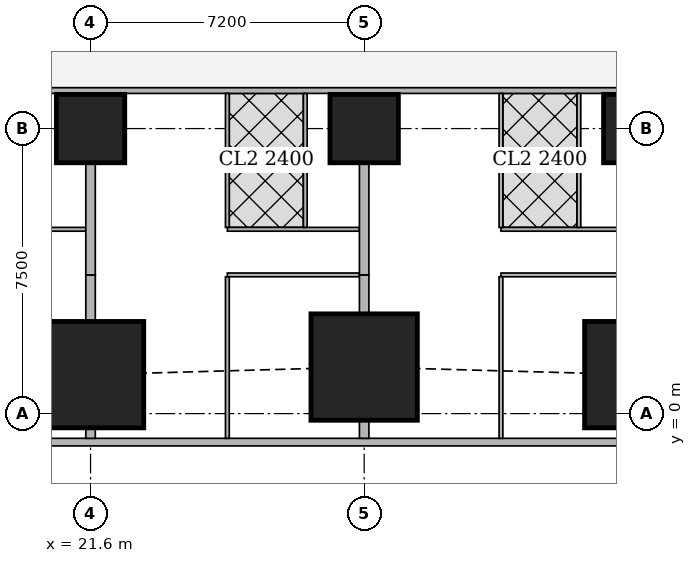
"""IFC4 building model, lengths in metres.
Left out: names, types, materials, properties, quantities, classifications, styles, units other than length and angle.
Written with IfcOpenShell. Run it as: python <this file> out.ifc"""

import sys

from ifc_helpers import new_model, si_unit, direction, frame, frame_2d, origin, origin_2d, place, context, subcontext, project, spatial, rectangle, extrude, element, fill, save


model = new_model("IFC4")
c1 = context("Model", 3, precision=1e-05, world=origin(), true_north=direction((0.0, 1.0)))
c2 = subcontext(c1, "Body", "Model", "MODEL_VIEW")
j1 = project(units=[si_unit("LENGTHUNIT", "METRE"), si_unit("PLANEANGLEUNIT", "RADIAN")], contexts=[c1])
p1 = place(None, origin())
s1 = spatial("IfcSite", under=j1, at=p1, CompositionType="ELEMENT")
p2 = place(p1, origin())
s2 = spatial("IfcBuilding", under=s1, at=p2, CompositionType="ELEMENT")
p3 = place(p2, frame((0.0, 0.0, 42.5)))
s3 = spatial("IfcBuildingStorey", under=s2, at=p3, CompositionType="ELEMENT", Elevation=42.5)
for number, where, z_axis, x_axis in (
    (1, (21.6, 1.025, 0.0), (0.0, 0.0, 1.0), (1.0, 0.0, 0.0)),
    (2, (28.8, 1.225, 0.0), (0.0, 0.0, 1.0), (1.0, 0.0, 0.0)),
    (3, (36.0, 1.025, 0.0), (0.0, 0.0, 1.0), (1.0, 0.0, 0.0)),
):
    element("IfcColumn", number, at=place(p3, frame(where, z_axis=z_axis, x_axis=x_axis)), inside=s3, PredefinedType="COLUMN", context=c2, shape_type="SweptSolid", body=[
        extrude(rectangle(XDim=2.8, YDim=2.8, at=origin_2d()), origin(), (0.0, 0.0, 1.0), 3.75),
    ])
for number, where, z_axis, x_axis in (
    (4, (21.6, 7.5, 0.0), (0.0, 0.0, 1.0), (1.0, 0.0, 0.0)),
    (5, (28.8, 7.5, 0.0), (0.0, 0.0, 1.0), (1.0, 0.0, 0.0)),
    (6, (36.0, 7.5, 0.0), (0.0, 0.0, 1.0), (1.0, 0.0, 0.0)),
):
    element("IfcColumn", number, at=place(p3, frame(where, z_axis=z_axis, x_axis=x_axis)), inside=s3, PredefinedType="COLUMN", context=c2, shape_type="SweptSolid", body=[
        extrude(rectangle(XDim=1.8, YDim=1.8, at=origin_2d()), origin(), (0.0, 0.0, 1.0), 3.75),
    ])
p4 = place(p3, frame((2.163, -0.75, 0.0), z_axis=(0.0, 0.0, 1.0), x_axis=(1.0, 0.0, 0.0)))
e7 = element("IfcWall", 7, at=p4, inside=s3, PredefinedType="SOLIDWALL", context=c2, shape_type="SweptSolid", body=[
    extrude(rectangle(XDim=45.628, YDim=0.2, at=frame_2d((22.814, 0.0))), origin(), (0.0, 0.0, 1.0), 3.5),
])
p5 = place(p4, frame((9.537, 0.0, 0.9)))
e8 = element("IfcOpeningElement", 8, at=p5, cuts=e7, PredefinedType="OPENING", context=c2, shape_type="SweptSolid", body=[
    extrude(rectangle(XDim=1.8, YDim=1.5, at=frame_2d((0.9, 0.75))), frame((0.0, 0.11, 0.0), z_axis=(0.0, -1.0, 0.0), x_axis=(1.0, 0.0, 0.0)), (0.0, 0.0, 1.0), 0.22),
])
p6 = place(p4, frame((13.137, 0.0, 0.9)))
e9 = element("IfcOpeningElement", 9, at=p6, cuts=e7, PredefinedType="OPENING", context=c2, shape_type="SweptSolid", body=[
    extrude(rectangle(XDim=1.8, YDim=1.5, at=frame_2d((0.9, 0.75))), frame((0.0, 0.11, 0.0), z_axis=(0.0, -1.0, 0.0), x_axis=(1.0, 0.0, 0.0)), (0.0, 0.0, 1.0), 0.22),
])
p7 = place(p4, frame((16.737, 0.0, 0.9)))
e10 = element("IfcOpeningElement", 10, at=p7, cuts=e7, PredefinedType="OPENING", context=c2, shape_type="SweptSolid", body=[
    extrude(rectangle(XDim=1.8, YDim=1.5, at=frame_2d((0.9, 0.75))), frame((0.0, 0.11, 0.0), z_axis=(0.0, -1.0, 0.0), x_axis=(1.0, 0.0, 0.0)), (0.0, 0.0, 1.0), 0.22),
])
p8 = place(p4, frame((20.337, 0.0, 0.9)))
e11 = element("IfcOpeningElement", 11, at=p8, cuts=e7, PredefinedType="OPENING", context=c2, shape_type="SweptSolid", body=[
    extrude(rectangle(XDim=1.8, YDim=1.5, at=frame_2d((0.9, 0.75))), frame((0.0, 0.11, 0.0), z_axis=(0.0, -1.0, 0.0), x_axis=(1.0, 0.0, 0.0)), (0.0, 0.0, 1.0), 0.22),
])
p9 = place(p4, frame((23.937, 0.0, 0.9)))
e12 = element("IfcOpeningElement", 12, at=p9, cuts=e7, PredefinedType="OPENING", context=c2, shape_type="SweptSolid", body=[
    extrude(rectangle(XDim=1.8, YDim=1.5, at=frame_2d((0.9, 0.75))), frame((0.0, 0.11, 0.0), z_axis=(0.0, -1.0, 0.0), x_axis=(1.0, 0.0, 0.0)), (0.0, 0.0, 1.0), 0.22),
])
p10 = place(p4, frame((27.537, 0.0, 0.9)))
e13 = element("IfcOpeningElement", 13, at=p10, cuts=e7, PredefinedType="OPENING", context=c2, shape_type="SweptSolid", body=[
    extrude(rectangle(XDim=1.8, YDim=1.5, at=frame_2d((0.9, 0.75))), frame((0.0, 0.11, 0.0), z_axis=(0.0, -1.0, 0.0), x_axis=(1.0, 0.0, 0.0)), (0.0, 0.0, 1.0), 0.22),
])
p11 = place(p4, frame((31.137, 0.0, 0.9)))
e14 = element("IfcOpeningElement", 14, at=p11, cuts=e7, PredefinedType="OPENING", context=c2, shape_type="SweptSolid", body=[
    extrude(rectangle(XDim=1.8, YDim=1.5, at=frame_2d((0.9, 0.75))), frame((0.0, 0.11, 0.0), z_axis=(0.0, -1.0, 0.0), x_axis=(1.0, 0.0, 0.0)), (0.0, 0.0, 1.0), 0.22),
])
p12 = place(p4, frame((34.737, 0.0, 0.9)))
e15 = element("IfcOpeningElement", 15, at=p12, cuts=e7, PredefinedType="OPENING", context=c2, shape_type="SweptSolid", body=[
    extrude(rectangle(XDim=1.8, YDim=1.5, at=frame_2d((0.9, 0.75))), frame((0.0, 0.11, 0.0), z_axis=(0.0, -1.0, 0.0), x_axis=(1.0, 0.0, 0.0)), (0.0, 0.0, 1.0), 0.22),
])
p13 = place(p3, frame((40.054, 8.5, 0.0), z_axis=(0.0, 0.0, 1.0), x_axis=(-1.0, 0.0, 0.0)))
e16 = element("IfcWall", 16, at=p13, inside=s3, PredefinedType="SOLIDWALL", context=c2, shape_type="SweptSolid", body=[
    extrude(rectangle(XDim=31.704, YDim=0.15, at=frame_2d((15.852, 0.0))), origin(), (0.0, 0.0, 1.0), 3.5),
])
p14 = place(p13, frame((27.321, 0.0, 0.0)))
e17 = element("IfcOpeningElement", 17, at=p14, cuts=e16, PredefinedType="OPENING", context=c2, shape_type="SweptSolid", body=[
    extrude(rectangle(XDim=1.0, YDim=2.1, at=frame_2d((0.5, 1.05))), frame((0.0, 0.085, 0.0), z_axis=(0.0, -1.0, 0.0), x_axis=(1.0, 0.0, 0.0)), (0.0, 0.0, 1.0), 0.17),
])
p15 = place(p13, frame((23.054, 0.0, 0.0)))
e18 = element("IfcOpeningElement", 18, at=p15, cuts=e16, PredefinedType="OPENING", context=c2, shape_type="SweptSolid", body=[
    extrude(rectangle(XDim=1.0, YDim=2.1, at=frame_2d((0.5, 1.05))), frame((0.0, 0.085, 0.0), z_axis=(0.0, -1.0, 0.0), x_axis=(1.0, 0.0, 0.0)), (0.0, 0.0, 1.0), 0.17),
])
p16 = place(p13, frame((15.854, 0.0, 0.0)))
e19 = element("IfcOpeningElement", 19, at=p16, cuts=e16, PredefinedType="OPENING", context=c2, shape_type="SweptSolid", body=[
    extrude(rectangle(XDim=1.0, YDim=2.1, at=frame_2d((0.5, 1.05))), frame((0.0, 0.085, 0.0), z_axis=(0.0, -1.0, 0.0), x_axis=(1.0, 0.0, 0.0)), (0.0, 0.0, 1.0), 0.17),
])
p17 = place(p13, frame((8.654, 0.0, 0.0)))
e20 = element("IfcOpeningElement", 20, at=p17, cuts=e16, PredefinedType="OPENING", context=c2, shape_type="SweptSolid", body=[
    extrude(rectangle(XDim=1.0, YDim=2.1, at=frame_2d((0.5, 1.05))), frame((0.0, 0.085, 0.0), z_axis=(0.0, -1.0, 0.0), x_axis=(1.0, 0.0, 0.0)), (0.0, 0.0, 1.0), 0.17),
])
p18 = place(p13, frame((0.15, 0.0, 0.0)))
e21 = element("IfcOpeningElement", 21, at=p18, cuts=e16, PredefinedType="OPENING", context=c2, shape_type="SweptSolid", body=[
    extrude(rectangle(XDim=1.0, YDim=2.1, at=frame_2d((0.5, 1.05))), frame((0.0, 0.085, 0.0), z_axis=(0.0, -1.0, 0.0), x_axis=(1.0, 0.0, 0.0)), (0.0, 0.0, 1.0), 0.17),
])
p19 = place(p3, frame((33.68, 42.723, 0.0), z_axis=(0.0, 0.0, 1.0), x_axis=(0.185624129307, -0.98262082342, 0.0)))
e22 = element("IfcWall", 22, at=p19, inside=s3, PredefinedType="SOLIDWALL", context=c2, shape_type="SweptSolid", body=[
    extrude(rectangle(XDim=41.051, YDim=0.15, at=frame_2d((20.526, 0.0))), origin(), (0.0, 0.0, 1.0), 2.5),
])
p20 = place(p19, frame((7.73, 0.0, 0.0)))
e23 = element("IfcOpeningElement", 23, at=p20, cuts=e22, PredefinedType="OPENING", context=c2, shape_type="SweptSolid", body=[
    extrude(rectangle(XDim=1.0, YDim=2.1, at=frame_2d((0.5, 1.05))), frame((0.0, 0.085, 0.0), z_axis=(0.0, -1.0, 0.0), x_axis=(1.0, 0.0, 0.0)), (0.0, 0.0, 1.0), 0.17),
])
p21 = place(p19, frame((12.307, 0.0, 0.0)))
e24 = element("IfcOpeningElement", 24, at=p21, cuts=e22, PredefinedType="OPENING", context=c2, shape_type="SweptSolid", body=[
    extrude(rectangle(XDim=1.0, YDim=2.1, at=frame_2d((0.5, 1.05))), frame((0.0, 0.085, 0.0), z_axis=(0.0, -1.0, 0.0), x_axis=(1.0, 0.0, 0.0)), (0.0, 0.0, 1.0), 0.17),
])
p22 = place(p19, frame((19.938, 0.0, 0.0)))
e25 = element("IfcOpeningElement", 25, at=p22, cuts=e22, PredefinedType="OPENING", context=c2, shape_type="SweptSolid", body=[
    extrude(rectangle(XDim=1.0, YDim=2.1, at=frame_2d((0.5, 1.05))), frame((0.0, 0.085, 0.0), z_axis=(0.0, -1.0, 0.0), x_axis=(1.0, 0.0, 0.0)), (0.0, 0.0, 1.0), 0.17),
])
p23 = place(p19, frame((32.193, 0.0, 0.0)))
e26 = element("IfcOpeningElement", 26, at=p23, cuts=e22, PredefinedType="OPENING", context=c2, shape_type="SweptSolid", body=[
    extrude(rectangle(XDim=1.0, YDim=2.1, at=frame_2d((0.5, 1.05))), frame((0.0, 0.085, 0.0), z_axis=(0.0, -1.0, 0.0), x_axis=(1.0, 0.0, 0.0)), (0.0, 0.0, 1.0), 0.17),
])
p24 = place(p3, frame((21.475, 4.85, 0.0), z_axis=(0.0, 0.0, 1.0), x_axis=(-1.0, 0.0, 0.0)))
e27 = element("IfcWall", 27, at=p24, inside=s3, PredefinedType="PARTITIONING", context=c2, shape_type="SweptSolid", body=[
    extrude(rectangle(XDim=3.475, YDim=0.1, at=frame_2d((1.738, 0.0))), origin(), (0.0, 0.0, 1.0), 3.5),
])
p25 = place(p24, frame((2.0, 0.0, 0.0)))
e28 = element("IfcOpeningElement", 28, at=p25, cuts=e27, PredefinedType="OPENING", context=c2, shape_type="SweptSolid", body=[
    extrude(rectangle(XDim=0.9, YDim=2.1, at=frame_2d((0.45, 1.05))), frame((0.0, 0.06, 0.0), z_axis=(0.0, -1.0, 0.0), x_axis=(1.0, 0.0, 0.0)), (0.0, 0.0, 1.0), 0.12),
])
p26 = place(p24, frame((0.2, 0.0, 0.0)))
e29 = element("IfcOpeningElement", 29, at=p26, cuts=e27, PredefinedType="OPENING", context=c2, shape_type="SweptSolid", body=[
    extrude(rectangle(XDim=0.9, YDim=2.1, at=frame_2d((0.45, 1.05))), frame((0.0, 0.06, 0.0), z_axis=(0.0, -1.0, 0.0), x_axis=(1.0, 0.0, 0.0)), (0.0, 0.0, 1.0), 0.12),
])
p27 = place(p3, frame((28.675, 3.65, 0.0), z_axis=(0.0, 0.0, 1.0), x_axis=(-1.0, 0.0, 0.0)))
e30 = element("IfcWall", 30, at=p27, inside=s3, PredefinedType="PARTITIONING", context=c2, shape_type="SweptSolid", body=[
    extrude(rectangle(XDim=3.475, YDim=0.1, at=frame_2d((1.738, 0.0))), origin(), (0.0, 0.0, 1.0), 3.5),
])
p28 = place(p27, frame((2.375, 0.0, 0.0)))
e31 = element("IfcOpeningElement", 31, at=p28, cuts=e30, PredefinedType="OPENING", context=c2, shape_type="SweptSolid", body=[
    extrude(rectangle(XDim=0.9, YDim=2.1, at=frame_2d((0.45, 1.05))), frame((0.0, 0.06, 0.0), z_axis=(0.0, -1.0, 0.0), x_axis=(1.0, 0.0, 0.0)), (0.0, 0.0, 1.0), 0.12),
])
p29 = place(p3, frame((28.675, 4.85, 0.0), z_axis=(0.0, 0.0, 1.0), x_axis=(-1.0, 0.0, 0.0)))
e32 = element("IfcWall", 32, at=p29, inside=s3, PredefinedType="PARTITIONING", context=c2, shape_type="SweptSolid", body=[
    extrude(rectangle(XDim=3.475, YDim=0.1, at=frame_2d((1.738, 0.0))), origin(), (0.0, 0.0, 1.0), 3.5),
])
p30 = place(p29, frame((2.0, 0.0, 0.0)))
e33 = element("IfcOpeningElement", 33, at=p30, cuts=e32, PredefinedType="OPENING", context=c2, shape_type="SweptSolid", body=[
    extrude(rectangle(XDim=0.9, YDim=2.1, at=frame_2d((0.45, 1.05))), frame((0.0, 0.06, 0.0), z_axis=(0.0, -1.0, 0.0), x_axis=(1.0, 0.0, 0.0)), (0.0, 0.0, 1.0), 0.12),
])
p31 = place(p29, frame((0.2, 0.0, 0.0)))
e34 = element("IfcOpeningElement", 34, at=p31, cuts=e32, PredefinedType="OPENING", context=c2, shape_type="SweptSolid", body=[
    extrude(rectangle(XDim=0.9, YDim=2.1, at=frame_2d((0.45, 1.05))), frame((0.0, 0.06, 0.0), z_axis=(0.0, -1.0, 0.0), x_axis=(1.0, 0.0, 0.0)), (0.0, 0.0, 1.0), 0.12),
])
p32 = place(p3, frame((25.2, -0.65, 0.0), z_axis=(0.0, 0.0, 1.0), x_axis=(0.0, 1.0, 0.0)))
e35 = element("IfcWall", 35, at=p32, inside=s3, PredefinedType="PARTITIONING", context=c2, shape_type="SweptSolid", body=[
    extrude(rectangle(XDim=4.25, YDim=0.1, at=frame_2d((2.125, 0.0))), origin(), (0.0, 0.0, 1.0), 2.05),
])
for number, where, z_axis, x_axis in (
    (36, (25.2, 4.9, 0.0), (0.0, 0.0, 1.0), (0.0, 1.0, 0.0)),
    (37, (27.25, 4.9, 0.0), (0.0, 0.0, 1.0), (0.0, 1.0, 0.0)),
):
    element("IfcWall", number, at=place(p3, frame(where, z_axis=z_axis, x_axis=x_axis)), inside=s3, PredefinedType="PARTITIONING", context=c2, shape_type="SweptSolid", body=[
        extrude(rectangle(XDim=3.525, YDim=0.1, at=frame_2d((1.763, 0.0))), origin(), (0.0, 0.0, 1.0), 3.5),
    ])
p33 = place(p3, frame((21.6, -0.65, 0.0), z_axis=(0.0, 0.0, 1.0), x_axis=(0.0, 1.0, 0.0)))
e38 = element("IfcWall", 38, at=p33, inside=s3, PredefinedType="SOLIDWALL", context=c2, shape_type="SweptSolid", body=[
    extrude(rectangle(XDim=0.274, YDim=0.25, at=frame_2d((0.137, 0.0))), origin(), (0.0, 0.0, 1.0), 3.5),
])
p34 = place(p3, frame((21.6, 2.426, 0.0), z_axis=(0.0, 0.0, 1.0), x_axis=(0.0, 1.0, 0.0)))
e39 = element("IfcWall", 39, at=p34, inside=s3, PredefinedType="SOLIDWALL", context=c2, shape_type="SweptSolid", body=[
    extrude(rectangle(XDim=1.224, YDim=0.25, at=frame_2d((0.612, 0.0))), origin(), (0.0, 0.0, 1.0), 3.5),
])
p35 = place(p3, frame((21.6, 3.65, 0.0), z_axis=(0.0, 0.0, 1.0), x_axis=(0.0, 1.0, 0.0)))
e40 = element("IfcWall", 40, at=p35, inside=s3, PredefinedType="SOLIDWALL", context=c2, shape_type="SweptSolid", body=[
    extrude(rectangle(XDim=2.949, YDim=0.25, at=frame_2d((1.475, 0.0))), origin(), (0.0, 0.0, 1.0), 3.5),
])
p36 = place(p3, frame((35.875, 3.65, 0.0), z_axis=(0.0, 0.0, 1.0), x_axis=(-1.0, 0.0, 0.0)))
e41 = element("IfcWall", 41, at=p36, inside=s3, PredefinedType="PARTITIONING", context=c2, shape_type="SweptSolid", body=[
    extrude(rectangle(XDim=3.475, YDim=0.1, at=frame_2d((1.738, 0.0))), origin(), (0.0, 0.0, 1.0), 3.5),
])
p37 = place(p36, frame((2.375, 0.0, 0.0)))
e42 = element("IfcOpeningElement", 42, at=p37, cuts=e41, PredefinedType="OPENING", context=c2, shape_type="SweptSolid", body=[
    extrude(rectangle(XDim=0.9, YDim=2.1, at=frame_2d((0.45, 1.05))), frame((0.0, 0.06, 0.0), z_axis=(0.0, -1.0, 0.0), x_axis=(1.0, 0.0, 0.0)), (0.0, 0.0, 1.0), 0.12),
])
p38 = place(p3, frame((35.875, 4.85, 0.0), z_axis=(0.0, 0.0, 1.0), x_axis=(-1.0, 0.0, 0.0)))
e43 = element("IfcWall", 43, at=p38, inside=s3, PredefinedType="PARTITIONING", context=c2, shape_type="SweptSolid", body=[
    extrude(rectangle(XDim=3.475, YDim=0.1, at=frame_2d((1.738, 0.0))), origin(), (0.0, 0.0, 1.0), 3.5),
])
p39 = place(p38, frame((2.0, 0.0, 0.0)))
e44 = element("IfcOpeningElement", 44, at=p39, cuts=e43, PredefinedType="OPENING", context=c2, shape_type="SweptSolid", body=[
    extrude(rectangle(XDim=0.9, YDim=2.1, at=frame_2d((0.45, 1.05))), frame((0.0, 0.06, 0.0), z_axis=(0.0, -1.0, 0.0), x_axis=(1.0, 0.0, 0.0)), (0.0, 0.0, 1.0), 0.12),
])
p40 = place(p38, frame((0.2, 0.0, 0.0)))
e45 = element("IfcOpeningElement", 45, at=p40, cuts=e43, PredefinedType="OPENING", context=c2, shape_type="SweptSolid", body=[
    extrude(rectangle(XDim=0.9, YDim=2.1, at=frame_2d((0.45, 1.05))), frame((0.0, 0.06, 0.0), z_axis=(0.0, -1.0, 0.0), x_axis=(1.0, 0.0, 0.0)), (0.0, 0.0, 1.0), 0.12),
])
p41 = place(p3, frame((32.4, -0.65, 0.0), z_axis=(0.0, 0.0, 1.0), x_axis=(0.0, 1.0, 0.0)))
e46 = element("IfcWall", 46, at=p41, inside=s3, PredefinedType="PARTITIONING", context=c2, shape_type="SweptSolid", body=[
    extrude(rectangle(XDim=4.25, YDim=0.1, at=frame_2d((2.125, 0.0))), origin(), (0.0, 0.0, 1.0), 2.05),
])
for number, where, z_axis, x_axis in (
    (47, (32.4, 4.9, 0.0), (0.0, 0.0, 1.0), (0.0, 1.0, 0.0)),
    (48, (34.45, 4.9, 0.0), (0.0, 0.0, 1.0), (0.0, 1.0, 0.0)),
):
    element("IfcWall", number, at=place(p3, frame(where, z_axis=z_axis, x_axis=x_axis)), inside=s3, PredefinedType="PARTITIONING", context=c2, shape_type="SweptSolid", body=[
        extrude(rectangle(XDim=3.525, YDim=0.1, at=frame_2d((1.763, 0.0))), origin(), (0.0, 0.0, 1.0), 3.5),
    ])
p42 = place(p3, frame((28.8, -0.65, 0.0), z_axis=(0.0, 0.0, 1.0), x_axis=(0.0, 1.0, 0.0)))
e49 = element("IfcWall", 49, at=p42, inside=s3, PredefinedType="SOLIDWALL", context=c2, shape_type="SweptSolid", body=[
    extrude(rectangle(XDim=0.474, YDim=0.25, at=frame_2d((0.237, 0.0))), origin(), (0.0, 0.0, 1.0), 3.5),
])
p43 = place(p3, frame((28.8, 2.626, 0.0), z_axis=(0.0, 0.0, 1.0), x_axis=(0.0, 1.0, 0.0)))
e50 = element("IfcWall", 50, at=p43, inside=s3, PredefinedType="SOLIDWALL", context=c2, shape_type="SweptSolid", body=[
    extrude(rectangle(XDim=1.024, YDim=0.25, at=frame_2d((0.512, 0.0))), origin(), (0.0, 0.0, 1.0), 3.5),
])
p44 = place(p3, frame((28.8, 3.65, 0.0), z_axis=(0.0, 0.0, 1.0), x_axis=(0.0, 1.0, 0.0)))
e51 = element("IfcWall", 51, at=p44, inside=s3, PredefinedType="SOLIDWALL", context=c2, shape_type="SweptSolid", body=[
    extrude(rectangle(XDim=2.949, YDim=0.25, at=frame_2d((1.475, 0.0))), origin(), (0.0, 0.0, 1.0), 3.5),
])
p45 = place(p7, origin())
e52 = element("IfcWindow", 52, at=p45, inside=s3, PartitioningType="SINGLE_PANEL", PredefinedType="WINDOW", context=c2, shape_type="SweptSolid", body=[
    extrude(rectangle(XDim=1.8, YDim=1.5, at=frame_2d((0.9, 0.75))), frame((0.0, 0.03, 0.0), z_axis=(0.0, -1.0, 0.0), x_axis=(1.0, 0.0, 0.0)), (0.0, 0.0, 1.0), 0.06),
])
fill(e10, e52)
p46 = place(p8, origin())
e53 = element("IfcWindow", 53, at=p46, inside=s3, PartitioningType="SINGLE_PANEL", PredefinedType="WINDOW", context=c2, shape_type="SweptSolid", body=[
    extrude(rectangle(XDim=1.8, YDim=1.5, at=frame_2d((0.9, 0.75))), frame((0.0, 0.03, 0.0), z_axis=(0.0, -1.0, 0.0), x_axis=(1.0, 0.0, 0.0)), (0.0, 0.0, 1.0), 0.06),
])
fill(e11, e53)
p47 = place(p9, origin())
e54 = element("IfcWindow", 54, at=p47, inside=s3, PartitioningType="SINGLE_PANEL", PredefinedType="WINDOW", context=c2, shape_type="SweptSolid", body=[
    extrude(rectangle(XDim=1.8, YDim=1.5, at=frame_2d((0.9, 0.75))), frame((0.0, 0.03, 0.0), z_axis=(0.0, -1.0, 0.0), x_axis=(1.0, 0.0, 0.0)), (0.0, 0.0, 1.0), 0.06),
])
fill(e12, e54)
p48 = place(p10, origin())
e55 = element("IfcWindow", 55, at=p48, inside=s3, PartitioningType="SINGLE_PANEL", PredefinedType="WINDOW", context=c2, shape_type="SweptSolid", body=[
    extrude(rectangle(XDim=1.8, YDim=1.5, at=frame_2d((0.9, 0.75))), frame((0.0, 0.03, 0.0), z_axis=(0.0, -1.0, 0.0), x_axis=(1.0, 0.0, 0.0)), (0.0, 0.0, 1.0), 0.06),
])
fill(e13, e55)
p49 = place(p11, origin())
e56 = element("IfcWindow", 56, at=p49, inside=s3, PartitioningType="SINGLE_PANEL", PredefinedType="WINDOW", context=c2, shape_type="SweptSolid", body=[
    extrude(rectangle(XDim=1.8, YDim=1.5, at=frame_2d((0.9, 0.75))), frame((0.0, 0.03, 0.0), z_axis=(0.0, -1.0, 0.0), x_axis=(1.0, 0.0, 0.0)), (0.0, 0.0, 1.0), 0.06),
])
fill(e14, e56)
p50 = place(p26, origin())
e57 = element("IfcDoor", 57, at=p50, inside=s3, OperationType="SINGLE_SWING_RIGHT", PredefinedType="DOOR", context=c2, shape_type="SweptSolid", body=[
    extrude(rectangle(XDim=0.9, YDim=2.1, at=frame_2d((0.45, 1.05))), frame((0.0, 0.025, 0.0), z_axis=(0.0, -1.0, 0.0), x_axis=(1.0, 0.0, 0.0)), (0.0, 0.0, 1.0), 0.05),
])
fill(e29, e57)
p51 = place(p28, origin())
e58 = element("IfcDoor", 58, at=p51, inside=s3, OperationType="SINGLE_SWING_RIGHT", PredefinedType="DOOR", context=c2, shape_type="SweptSolid", body=[
    extrude(rectangle(XDim=0.9, YDim=2.1, at=frame_2d((0.45, 1.05))), frame((0.0, 0.025, 0.0), z_axis=(0.0, -1.0, 0.0), x_axis=(1.0, 0.0, 0.0)), (0.0, 0.0, 1.0), 0.05),
])
fill(e31, e58)
p52 = place(p30, origin())
e59 = element("IfcDoor", 59, at=p52, inside=s3, OperationType="SINGLE_SWING_LEFT", PredefinedType="DOOR", context=c2, shape_type="SweptSolid", body=[
    extrude(rectangle(XDim=0.9, YDim=2.1, at=frame_2d((0.45, 1.05))), frame((0.0, 0.025, 0.0), z_axis=(0.0, -1.0, 0.0), x_axis=(1.0, 0.0, 0.0)), (0.0, 0.0, 1.0), 0.05),
])
fill(e33, e59)
p53 = place(p31, origin())
e60 = element("IfcDoor", 60, at=p53, inside=s3, OperationType="SINGLE_SWING_RIGHT", PredefinedType="DOOR", context=c2, shape_type="SweptSolid", body=[
    extrude(rectangle(XDim=0.9, YDim=2.1, at=frame_2d((0.45, 1.05))), frame((0.0, 0.025, 0.0), z_axis=(0.0, -1.0, 0.0), x_axis=(1.0, 0.0, 0.0)), (0.0, 0.0, 1.0), 0.05),
])
fill(e34, e60)
p54 = place(p16, origin())
e61 = element("IfcDoor", 61, at=p54, inside=s3, OperationType="SINGLE_SWING_LEFT", PredefinedType="DOOR", context=c2, shape_type="SweptSolid", body=[
    extrude(rectangle(XDim=1.0, YDim=2.1, at=frame_2d((0.5, 1.05))), frame((0.0, 0.025, 0.0), z_axis=(0.0, -1.0, 0.0), x_axis=(1.0, 0.0, 0.0)), (0.0, 0.0, 1.0), 0.05),
])
fill(e19, e61)
p55 = place(p37, origin())
e62 = element("IfcDoor", 62, at=p55, inside=s3, OperationType="SINGLE_SWING_RIGHT", PredefinedType="DOOR", context=c2, shape_type="SweptSolid", body=[
    extrude(rectangle(XDim=0.9, YDim=2.1, at=frame_2d((0.45, 1.05))), frame((0.0, 0.025, 0.0), z_axis=(0.0, -1.0, 0.0), x_axis=(1.0, 0.0, 0.0)), (0.0, 0.0, 1.0), 0.05),
])
fill(e42, e62)
p56 = place(p39, origin())
e63 = element("IfcDoor", 63, at=p56, inside=s3, OperationType="SINGLE_SWING_LEFT", PredefinedType="DOOR", context=c2, shape_type="SweptSolid", body=[
    extrude(rectangle(XDim=0.9, YDim=2.1, at=frame_2d((0.45, 1.05))), frame((0.0, 0.025, 0.0), z_axis=(0.0, -1.0, 0.0), x_axis=(1.0, 0.0, 0.0)), (0.0, 0.0, 1.0), 0.05),
])
fill(e44, e63)
p57 = place(p40, origin())
e64 = element("IfcDoor", 64, at=p57, inside=s3, OperationType="SINGLE_SWING_RIGHT", PredefinedType="DOOR", context=c2, shape_type="SweptSolid", body=[
    extrude(rectangle(XDim=0.9, YDim=2.1, at=frame_2d((0.45, 1.05))), frame((0.0, 0.025, 0.0), z_axis=(0.0, -1.0, 0.0), x_axis=(1.0, 0.0, 0.0)), (0.0, 0.0, 1.0), 0.05),
])
fill(e45, e64)
p58 = place(p17, origin())
e65 = element("IfcDoor", 65, at=p58, inside=s3, OperationType="SINGLE_SWING_LEFT", PredefinedType="DOOR", context=c2, shape_type="SweptSolid", body=[
    extrude(rectangle(XDim=1.0, YDim=2.1, at=frame_2d((0.5, 1.05))), frame((0.0, 0.025, 0.0), z_axis=(0.0, -1.0, 0.0), x_axis=(1.0, 0.0, 0.0)), (0.0, 0.0, 1.0), 0.05),
])
fill(e20, e65)
save(model, sys.argv[1])
